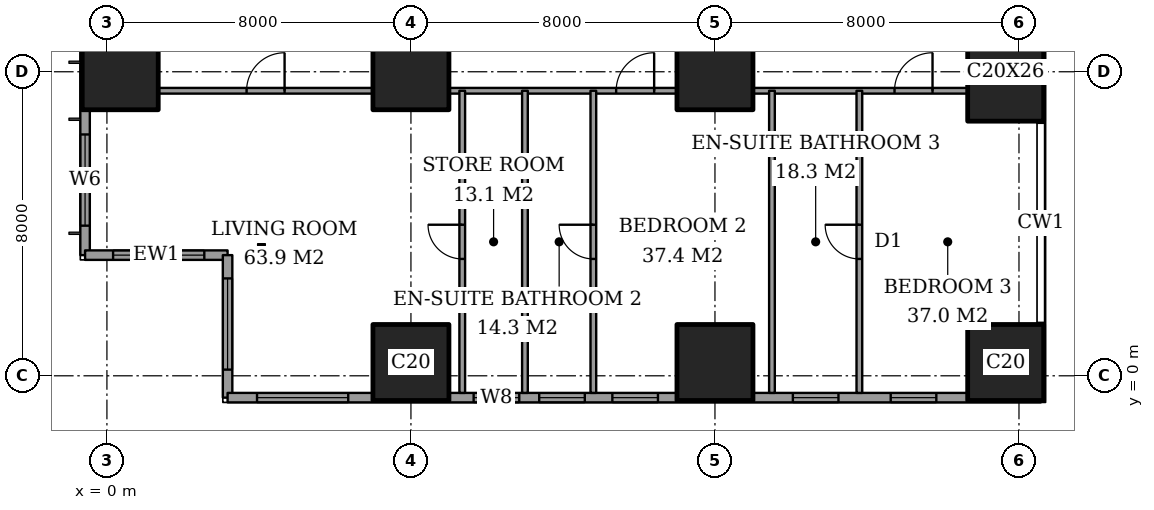
"""IFC4 building model, lengths in metres.
Left out: names, types, materials, properties, quantities, classifications, styles, units other than length and angle.
Written with IfcOpenShell. Run it as: python <this file> out.ifc"""

import sys

from ifc_helpers import new_model, si_unit, direction, frame, frame_2d, origin, origin_2d, place, context, subcontext, project, spatial, rectangle, extrude, element, fill, save


model = new_model("IFC4")
c1 = context("Model", 3, precision=1e-05, world=origin(), true_north=direction((0.0, 1.0)))
c2 = subcontext(c1, "Body", "Model", "MODEL_VIEW")
j1 = project(units=[si_unit("LENGTHUNIT", "METRE"), si_unit("PLANEANGLEUNIT", "RADIAN")], contexts=[c1])
p1 = place(None, origin())
s1 = spatial("IfcSite", under=j1, at=p1, CompositionType="ELEMENT")
p2 = place(p1, origin())
s2 = spatial("IfcBuilding", under=s1, at=p2, CompositionType="ELEMENT")
p3 = place(p2, frame((0.0, 0.0, 33.2)))
s3 = spatial("IfcBuildingStorey", under=s2, at=p3, CompositionType="ELEMENT", Elevation=33.2)
for number, where, z_axis, x_axis in (
    (1, (0.35, 8.0, 0.0), (0.0, 0.0, 1.0), (1.0, 0.0, 0.0)),
    (2, (8.0, 0.35, 0.0), (0.0, 0.0, 1.0), (1.0, 0.0, 0.0)),
    (3, (8.0, 8.0, 0.0), (0.0, 0.0, 1.0), (1.0, 0.0, 0.0)),
    (4, (16.0, 0.35, 0.0), (0.0, 0.0, 1.0), (1.0, 0.0, 0.0)),
    (5, (16.0, 8.0, 0.0), (0.0, 0.0, 1.0), (1.0, 0.0, 0.0)),
    (6, (23.65, 0.35, 0.0), (0.0, 0.0, 1.0), (1.0, 0.0, 0.0)),
):
    element("IfcColumn", number, at=place(p3, frame(where, z_axis=z_axis, x_axis=x_axis)), inside=s3, PredefinedType="COLUMN", context=c2, shape_type="SweptSolid", body=[
        extrude(rectangle(XDim=2.0, YDim=2.0, at=origin_2d()), origin(), (0.0, 0.0, 1.0), 3.6),
    ])
p4 = place(p3, frame((23.65, 8.0, 0.0), z_axis=(0.0, 0.0, 1.0), x_axis=(1.0, 0.0, 0.0)))
e7 = element("IfcColumn", 7, at=p4, inside=s3, PredefinedType="COLUMN", context=c2, shape_type="SweptSolid", body=[
    extrude(rectangle(XDim=2.0, YDim=2.6, at=origin_2d()), origin(), (0.0, 0.0, 1.0), 3.6),
])
p5 = place(p3, frame((-0.575, 44.825, 0.0), z_axis=(0.0, 0.0, 1.0), x_axis=(0.0, -1.0, 0.0)))
e8 = element("IfcWall", 8, at=p5, inside=s3, PredefinedType="SOLIDWALL", context=c2, shape_type="SweptSolid", body=[
    extrude(rectangle(XDim=41.65, YDim=0.25, at=frame_2d((20.825, 0.0))), origin(), (0.0, 0.0, 1.0), 3.6),
])
p6 = place(p5, frame((0.775, 0.0, 0.6)))
e9 = element("IfcOpeningElement", 9, at=p6, cuts=e8, PredefinedType="OPENING", context=c2, shape_type="SweptSolid", body=[
    extrude(rectangle(XDim=2.4, YDim=2.0, at=frame_2d((1.2, 1.0))), frame((0.0, 0.135, 0.0), z_axis=(0.0, -1.0, 0.0), x_axis=(1.0, 0.0, 0.0)), (0.0, 0.0, 1.0), 0.27),
])
p7 = place(p5, frame((6.225, 0.0, 0.6)))
e10 = element("IfcOpeningElement", 10, at=p7, cuts=e8, PredefinedType="OPENING", context=c2, shape_type="SweptSolid", body=[
    extrude(rectangle(XDim=1.2, YDim=2.0, at=frame_2d((0.6, 1.0))), frame((0.0, 0.135, 0.0), z_axis=(0.0, -1.0, 0.0), x_axis=(1.0, 0.0, 0.0)), (0.0, 0.0, 1.0), 0.27),
])
p8 = place(p5, frame((8.625, 0.0, 0.6)))
e11 = element("IfcOpeningElement", 11, at=p8, cuts=e8, PredefinedType="OPENING", context=c2, shape_type="SweptSolid", body=[
    extrude(rectangle(XDim=2.4, YDim=2.0, at=frame_2d((1.2, 1.0))), frame((0.0, 0.135, 0.0), z_axis=(0.0, -1.0, 0.0), x_axis=(1.0, 0.0, 0.0)), (0.0, 0.0, 1.0), 0.27),
])
p9 = place(p5, frame((15.625, 0.0, 0.6)))
e12 = element("IfcOpeningElement", 12, at=p9, cuts=e8, PredefinedType="OPENING", context=c2, shape_type="SweptSolid", body=[
    extrude(rectangle(XDim=2.4, YDim=2.0, at=frame_2d((1.2, 1.0))), frame((0.0, 0.135, 0.0), z_axis=(0.0, -1.0, 0.0), x_axis=(1.0, 0.0, 0.0)), (0.0, 0.0, 1.0), 0.27),
])
p10 = place(p5, frame((23.625, 0.0, 0.6)))
e13 = element("IfcOpeningElement", 13, at=p10, cuts=e8, PredefinedType="OPENING", context=c2, shape_type="SweptSolid", body=[
    extrude(rectangle(XDim=2.4, YDim=2.0, at=frame_2d((1.2, 1.0))), frame((0.0, 0.135, 0.0), z_axis=(0.0, -1.0, 0.0), x_axis=(1.0, 0.0, 0.0)), (0.0, 0.0, 1.0), 0.27),
])
p11 = place(p5, frame((30.825, 0.0, 0.6)))
e14 = element("IfcOpeningElement", 14, at=p11, cuts=e8, PredefinedType="OPENING", context=c2, shape_type="SweptSolid", body=[
    extrude(rectangle(XDim=2.4, YDim=2.0, at=frame_2d((1.2, 1.0))), frame((0.0, 0.135, 0.0), z_axis=(0.0, -1.0, 0.0), x_axis=(1.0, 0.0, 0.0)), (0.0, 0.0, 1.0), 0.27),
])
p12 = place(p5, frame((34.5, 0.0, 0.6)))
e15 = element("IfcOpeningElement", 15, at=p12, cuts=e8, PredefinedType="OPENING", context=c2, shape_type="SweptSolid", body=[
    extrude(rectangle(XDim=1.2, YDim=2.0, at=frame_2d((0.6, 1.0))), frame((0.0, 0.135, 0.0), z_axis=(0.0, -1.0, 0.0), x_axis=(1.0, 0.0, 0.0)), (0.0, 0.0, 1.0), 0.27),
])
p13 = place(p5, frame((38.475, 0.0, 0.6)))
e16 = element("IfcOpeningElement", 16, at=p13, cuts=e8, PredefinedType="OPENING", context=c2, shape_type="SweptSolid", body=[
    extrude(rectangle(XDim=2.4, YDim=2.0, at=frame_2d((1.2, 1.0))), frame((0.0, 0.135, 0.0), z_axis=(0.0, -1.0, 0.0), x_axis=(1.0, 0.0, 0.0)), (0.0, 0.0, 1.0), 0.27),
])
p14 = place(p3, frame((-0.575, 3.175, 0.0), z_axis=(0.0, 0.0, 1.0), x_axis=(1.0, 0.0, 0.0)))
e17 = element("IfcWall", 17, at=p14, inside=s3, PredefinedType="SOLIDWALL", context=c2, shape_type="SweptSolid", body=[
    extrude(rectangle(XDim=3.75, YDim=0.25, at=frame_2d((1.875, 0.0))), origin(), (0.0, 0.0, 1.0), 3.6),
])
p15 = place(p14, frame((0.738, 0.0, 0.6)))
e18 = element("IfcOpeningElement", 18, at=p15, cuts=e17, PredefinedType="OPENING", context=c2, shape_type="SweptSolid", body=[
    extrude(rectangle(XDim=2.4, YDim=2.0, at=frame_2d((1.2, 1.0))), frame((0.0, 0.135, 0.0), z_axis=(0.0, -1.0, 0.0), x_axis=(1.0, 0.0, 0.0)), (0.0, 0.0, 1.0), 0.27),
])
p16 = place(p3, frame((3.175, 3.175, 0.0), z_axis=(0.0, 0.0, 1.0), x_axis=(0.0, -1.0, 0.0)))
e19 = element("IfcWall", 19, at=p16, inside=s3, PredefinedType="SOLIDWALL", context=c2, shape_type="SweptSolid", body=[
    extrude(rectangle(XDim=3.75, YDim=0.25, at=frame_2d((1.875, 0.0))), origin(), (0.0, 0.0, 1.0), 3.6),
])
p17 = place(p16, frame((0.613, 0.0, 0.6)))
e20 = element("IfcOpeningElement", 20, at=p17, cuts=e19, PredefinedType="OPENING", context=c2, shape_type="SweptSolid", body=[
    extrude(rectangle(XDim=2.4, YDim=2.0, at=frame_2d((1.2, 1.0))), frame((0.0, 0.135, 0.0), z_axis=(0.0, -1.0, 0.0), x_axis=(1.0, 0.0, 0.0)), (0.0, 0.0, 1.0), 0.27),
])
p18 = place(p3, frame((3.175, -0.575, 0.0), z_axis=(0.0, 0.0, 1.0), x_axis=(1.0, 0.0, 0.0)))
e21 = element("IfcWall", 21, at=p18, inside=s3, PredefinedType="SOLIDWALL", context=c2, shape_type="SweptSolid", body=[
    extrude(rectangle(XDim=21.4, YDim=0.25, at=frame_2d((10.7, 0.0))), origin(), (0.0, 0.0, 1.0), 3.6),
])
p19 = place(p18, frame((0.775, 0.0, 0.6)))
e22 = element("IfcOpeningElement", 22, at=p19, cuts=e21, PredefinedType="OPENING", context=c2, shape_type="SweptSolid", body=[
    extrude(rectangle(XDim=2.4, YDim=2.0, at=frame_2d((1.2, 1.0))), frame((0.0, 0.135, 0.0), z_axis=(0.0, -1.0, 0.0), x_axis=(1.0, 0.0, 0.0)), (0.0, 0.0, 1.0), 0.27),
])
p20 = place(p18, frame((6.475, 0.0, 0.6)))
e23 = element("IfcOpeningElement", 23, at=p20, cuts=e21, PredefinedType="OPENING", context=c2, shape_type="SweptSolid", body=[
    extrude(rectangle(XDim=1.2, YDim=2.0, at=frame_2d((0.6, 1.0))), frame((0.0, 0.135, 0.0), z_axis=(0.0, -1.0, 0.0), x_axis=(1.0, 0.0, 0.0)), (0.0, 0.0, 1.0), 0.27),
])
p21 = place(p18, frame((8.2, 0.0, 0.6)))
e24 = element("IfcOpeningElement", 24, at=p21, cuts=e21, PredefinedType="OPENING", context=c2, shape_type="SweptSolid", body=[
    extrude(rectangle(XDim=1.2, YDim=2.0, at=frame_2d((0.6, 1.0))), frame((0.0, 0.135, 0.0), z_axis=(0.0, -1.0, 0.0), x_axis=(1.0, 0.0, 0.0)), (0.0, 0.0, 1.0), 0.27),
])
p22 = place(p18, frame((10.125, 0.0, 0.6)))
e25 = element("IfcOpeningElement", 25, at=p22, cuts=e21, PredefinedType="OPENING", context=c2, shape_type="SweptSolid", body=[
    extrude(rectangle(XDim=1.2, YDim=2.0, at=frame_2d((0.6, 1.0))), frame((0.0, 0.135, 0.0), z_axis=(0.0, -1.0, 0.0), x_axis=(1.0, 0.0, 0.0)), (0.0, 0.0, 1.0), 0.27),
])
p23 = place(p18, frame((14.875, 0.0, 0.6)))
e26 = element("IfcOpeningElement", 26, at=p23, cuts=e21, PredefinedType="OPENING", context=c2, shape_type="SweptSolid", body=[
    extrude(rectangle(XDim=1.2, YDim=2.0, at=frame_2d((0.6, 1.0))), frame((0.0, 0.135, 0.0), z_axis=(0.0, -1.0, 0.0), x_axis=(1.0, 0.0, 0.0)), (0.0, 0.0, 1.0), 0.27),
])
p24 = place(p18, frame((17.45, 0.0, 0.6)))
e27 = element("IfcOpeningElement", 27, at=p24, cuts=e21, PredefinedType="OPENING", context=c2, shape_type="SweptSolid", body=[
    extrude(rectangle(XDim=1.2, YDim=2.0, at=frame_2d((0.6, 1.0))), frame((0.0, 0.135, 0.0), z_axis=(0.0, -1.0, 0.0), x_axis=(1.0, 0.0, 0.0)), (0.0, 0.0, 1.0), 0.27),
])
p25 = place(p3, frame((1.35, 7.5, 0.0), z_axis=(0.0, 0.0, 1.0), x_axis=(1.0, 0.0, 0.0)))
e28 = element("IfcWall", 28, at=p25, inside=s3, PredefinedType="PARTITIONING", context=c2, shape_type="SweptSolid", body=[
    extrude(rectangle(XDim=5.65, YDim=0.15, at=frame_2d((2.825, 0.0))), origin(), (0.0, 0.0, 1.0), 3.35),
])
p26 = place(p25, frame((2.325, 0.0, 0.0)))
e29 = element("IfcOpeningElement", 29, at=p26, cuts=e28, PredefinedType="OPENING", context=c2, shape_type="SweptSolid", body=[
    extrude(rectangle(XDim=1.0, YDim=2.1, at=frame_2d((0.5, 1.05))), frame((0.0, 0.085, 0.0), z_axis=(0.0, -1.0, 0.0), x_axis=(1.0, 0.0, 0.0)), (0.0, 0.0, 1.0), 0.17),
])
p27 = place(p3, frame((9.0, 7.5, 0.0), z_axis=(0.0, 0.0, 1.0), x_axis=(1.0, 0.0, 0.0)))
e30 = element("IfcWall", 30, at=p27, inside=s3, PredefinedType="PARTITIONING", context=c2, shape_type="SweptSolid", body=[
    extrude(rectangle(XDim=6.0, YDim=0.15, at=frame_2d((3.0, 0.0))), origin(), (0.0, 0.0, 1.0), 3.35),
])
p28 = place(p27, frame((4.4, 0.0, 0.0)))
e31 = element("IfcOpeningElement", 31, at=p28, cuts=e30, PredefinedType="OPENING", context=c2, shape_type="SweptSolid", body=[
    extrude(rectangle(XDim=1.0, YDim=2.1, at=frame_2d((0.5, 1.05))), frame((0.0, 0.085, 0.0), z_axis=(0.0, -1.0, 0.0), x_axis=(1.0, 0.0, 0.0)), (0.0, 0.0, 1.0), 0.17),
])
p29 = place(p3, frame((17.0, 7.5, 0.0), z_axis=(0.0, 0.0, 1.0), x_axis=(1.0, 0.0, 0.0)))
e32 = element("IfcWall", 32, at=p29, inside=s3, PredefinedType="PARTITIONING", context=c2, shape_type="SweptSolid", body=[
    extrude(rectangle(XDim=5.65, YDim=0.15, at=frame_2d((2.825, 0.0))), origin(), (0.0, 0.0, 1.0), 3.35),
])
p30 = place(p29, frame((3.725, 0.0, 0.0)))
e33 = element("IfcOpeningElement", 33, at=p30, cuts=e32, PredefinedType="OPENING", context=c2, shape_type="SweptSolid", body=[
    extrude(rectangle(XDim=1.0, YDim=2.1, at=frame_2d((0.5, 1.05))), frame((0.0, 0.085, 0.0), z_axis=(0.0, -1.0, 0.0), x_axis=(1.0, 0.0, 0.0)), (0.0, 0.0, 1.0), 0.17),
])
p31 = place(p3, frame((9.35, -0.45, 0.0), z_axis=(0.0, 0.0, 1.0), x_axis=(0.0, 1.0, 0.0)))
e34 = element("IfcWall", 34, at=p31, inside=s3, PredefinedType="PARTITIONING", context=c2, shape_type="SweptSolid", body=[
    extrude(rectangle(XDim=7.95, YDim=0.15, at=frame_2d((3.975, 0.0))), origin(), (0.0, 0.0, 1.0), 3.35),
])
p32 = place(p31, frame((3.525, 0.0, 0.0)))
e35 = element("IfcOpeningElement", 35, at=p32, cuts=e34, PredefinedType="OPENING", context=c2, shape_type="SweptSolid", body=[
    extrude(rectangle(XDim=0.9, YDim=2.1, at=frame_2d((0.45, 1.05))), frame((0.0, 0.085, 0.0), z_axis=(0.0, -1.0, 0.0), x_axis=(1.0, 0.0, 0.0)), (0.0, 0.0, 1.0), 0.17),
])
p33 = place(p3, frame((11.0, -0.45, 0.0), z_axis=(0.0, 0.0, 1.0), x_axis=(0.0, 1.0, 0.0)))
e36 = element("IfcWall", 36, at=p33, inside=s3, PredefinedType="PARTITIONING", context=c2, shape_type="SweptSolid", body=[
    extrude(rectangle(XDim=7.95, YDim=0.15, at=frame_2d((3.975, 0.0))), origin(), (0.0, 0.0, 1.0), 3.35),
])
p34 = place(p3, frame((12.8, -0.45, 0.0), z_axis=(0.0, 0.0, 1.0), x_axis=(0.0, 1.0, 0.0)))
e37 = element("IfcWall", 37, at=p34, inside=s3, PredefinedType="PARTITIONING", context=c2, shape_type="SweptSolid", body=[
    extrude(rectangle(XDim=7.95, YDim=0.15, at=frame_2d((3.975, 0.0))), origin(), (0.0, 0.0, 1.0), 3.35),
])
p35 = place(p34, frame((3.525, 0.0, 0.0)))
e38 = element("IfcOpeningElement", 38, at=p35, cuts=e37, PredefinedType="OPENING", context=c2, shape_type="SweptSolid", body=[
    extrude(rectangle(XDim=0.9, YDim=2.1, at=frame_2d((0.45, 1.05))), frame((0.0, 0.085, 0.0), z_axis=(0.0, -1.0, 0.0), x_axis=(1.0, 0.0, 0.0)), (0.0, 0.0, 1.0), 0.17),
])
p36 = place(p3, frame((17.5, -0.45, 0.0), z_axis=(0.0, 0.0, 1.0), x_axis=(0.0, 1.0, 0.0)))
e39 = element("IfcWall", 39, at=p36, inside=s3, PredefinedType="PARTITIONING", context=c2, shape_type="SweptSolid", body=[
    extrude(rectangle(XDim=7.95, YDim=0.15, at=frame_2d((3.975, 0.0))), origin(), (0.0, 0.0, 1.0), 3.35),
])
p37 = place(p3, frame((19.8, -0.45, 0.0), z_axis=(0.0, 0.0, 1.0), x_axis=(0.0, 1.0, 0.0)))
e40 = element("IfcWall", 40, at=p37, inside=s3, PredefinedType="PARTITIONING", context=c2, shape_type="SweptSolid", body=[
    extrude(rectangle(XDim=7.95, YDim=0.15, at=frame_2d((3.975, 0.0))), origin(), (0.0, 0.0, 1.0), 3.35),
])
p38 = place(p37, frame((3.525, 0.0, 0.0)))
e41 = element("IfcOpeningElement", 41, at=p38, cuts=e40, PredefinedType="OPENING", context=c2, shape_type="SweptSolid", body=[
    extrude(rectangle(XDim=0.9, YDim=2.1, at=frame_2d((0.45, 1.05))), frame((0.0, 0.085, 0.0), z_axis=(0.0, -1.0, 0.0), x_axis=(1.0, 0.0, 0.0)), (0.0, 0.0, 1.0), 0.17),
])
p39 = place(p13, origin())
e42 = element("IfcWindow", 42, at=p39, inside=s3, PartitioningType="SINGLE_PANEL", PredefinedType="WINDOW", context=c2, shape_type="SweptSolid", body=[
    extrude(rectangle(XDim=2.4, YDim=2.0, at=frame_2d((1.2, 1.0))), frame((0.0, 0.03, 0.0), z_axis=(0.0, -1.0, 0.0), x_axis=(1.0, 0.0, 0.0)), (0.0, 0.0, 1.0), 0.06),
])
fill(e16, e42)
p40 = place(p15, origin())
e43 = element("IfcWindow", 43, at=p40, inside=s3, PartitioningType="SINGLE_PANEL", PredefinedType="WINDOW", context=c2, shape_type="SweptSolid", body=[
    extrude(rectangle(XDim=2.4, YDim=2.0, at=frame_2d((1.2, 1.0))), frame((0.0, 0.03, 0.0), z_axis=(0.0, -1.0, 0.0), x_axis=(1.0, 0.0, 0.0)), (0.0, 0.0, 1.0), 0.06),
])
fill(e18, e43)
p41 = place(p17, origin())
e44 = element("IfcWindow", 44, at=p41, inside=s3, PartitioningType="SINGLE_PANEL", PredefinedType="WINDOW", context=c2, shape_type="SweptSolid", body=[
    extrude(rectangle(XDim=2.4, YDim=2.0, at=frame_2d((1.2, 1.0))), frame((0.0, 0.03, 0.0), z_axis=(0.0, -1.0, 0.0), x_axis=(1.0, 0.0, 0.0)), (0.0, 0.0, 1.0), 0.06),
])
fill(e20, e44)
p42 = place(p19, origin())
e45 = element("IfcWindow", 45, at=p42, inside=s3, PartitioningType="SINGLE_PANEL", PredefinedType="WINDOW", context=c2, shape_type="SweptSolid", body=[
    extrude(rectangle(XDim=2.4, YDim=2.0, at=frame_2d((1.2, 1.0))), frame((0.0, 0.03, 0.0), z_axis=(0.0, -1.0, 0.0), x_axis=(1.0, 0.0, 0.0)), (0.0, 0.0, 1.0), 0.06),
])
fill(e22, e45)
p43 = place(p20, origin())
e46 = element("IfcWindow", 46, at=p43, inside=s3, PartitioningType="SINGLE_PANEL", PredefinedType="WINDOW", context=c2, shape_type="SweptSolid", body=[
    extrude(rectangle(XDim=1.2, YDim=2.0, at=frame_2d((0.6, 1.0))), frame((0.0, 0.03, 0.0), z_axis=(0.0, -1.0, 0.0), x_axis=(1.0, 0.0, 0.0)), (0.0, 0.0, 1.0), 0.06),
])
fill(e23, e46)
p44 = place(p21, origin())
e47 = element("IfcWindow", 47, at=p44, inside=s3, PartitioningType="SINGLE_PANEL", PredefinedType="WINDOW", context=c2, shape_type="SweptSolid", body=[
    extrude(rectangle(XDim=1.2, YDim=2.0, at=frame_2d((0.6, 1.0))), frame((0.0, 0.03, 0.0), z_axis=(0.0, -1.0, 0.0), x_axis=(1.0, 0.0, 0.0)), (0.0, 0.0, 1.0), 0.06),
])
fill(e24, e47)
p45 = place(p22, origin())
e48 = element("IfcWindow", 48, at=p45, inside=s3, PartitioningType="SINGLE_PANEL", PredefinedType="WINDOW", context=c2, shape_type="SweptSolid", body=[
    extrude(rectangle(XDim=1.2, YDim=2.0, at=frame_2d((0.6, 1.0))), frame((0.0, 0.03, 0.0), z_axis=(0.0, -1.0, 0.0), x_axis=(1.0, 0.0, 0.0)), (0.0, 0.0, 1.0), 0.06),
])
fill(e25, e48)
p46 = place(p23, origin())
e49 = element("IfcWindow", 49, at=p46, inside=s3, PartitioningType="SINGLE_PANEL", PredefinedType="WINDOW", context=c2, shape_type="SweptSolid", body=[
    extrude(rectangle(XDim=1.2, YDim=2.0, at=frame_2d((0.6, 1.0))), frame((0.0, 0.03, 0.0), z_axis=(0.0, -1.0, 0.0), x_axis=(1.0, 0.0, 0.0)), (0.0, 0.0, 1.0), 0.06),
])
fill(e26, e49)
p47 = place(p24, origin())
e50 = element("IfcWindow", 50, at=p47, inside=s3, PartitioningType="SINGLE_PANEL", PredefinedType="WINDOW", context=c2, shape_type="SweptSolid", body=[
    extrude(rectangle(XDim=1.2, YDim=2.0, at=frame_2d((0.6, 1.0))), frame((0.0, 0.03, 0.0), z_axis=(0.0, -1.0, 0.0), x_axis=(1.0, 0.0, 0.0)), (0.0, 0.0, 1.0), 0.06),
])
fill(e27, e50)
p48 = place(p26, origin())
e51 = element("IfcDoor", 51, at=p48, inside=s3, OperationType="SINGLE_SWING_LEFT", PredefinedType="DOOR", context=c2, shape_type="SweptSolid", body=[
    extrude(rectangle(XDim=1.0, YDim=2.1, at=frame_2d((0.5, 1.05))), frame((0.0, 0.025, 0.0), z_axis=(0.0, -1.0, 0.0), x_axis=(1.0, 0.0, 0.0)), (0.0, 0.0, 1.0), 0.05),
])
fill(e29, e51)
p49 = place(p32, origin())
e52 = element("IfcDoor", 52, at=p49, inside=s3, OperationType="SINGLE_SWING_LEFT", PredefinedType="DOOR", context=c2, shape_type="SweptSolid", body=[
    extrude(rectangle(XDim=0.9, YDim=2.1, at=frame_2d((0.45, 1.05))), frame((0.0, 0.025, 0.0), z_axis=(0.0, -1.0, 0.0), x_axis=(1.0, 0.0, 0.0)), (0.0, 0.0, 1.0), 0.05),
])
fill(e35, e52)
p50 = place(p35, origin())
e53 = element("IfcDoor", 53, at=p50, inside=s3, OperationType="SINGLE_SWING_LEFT", PredefinedType="DOOR", context=c2, shape_type="SweptSolid", body=[
    extrude(rectangle(XDim=0.9, YDim=2.1, at=frame_2d((0.45, 1.05))), frame((0.0, 0.025, 0.0), z_axis=(0.0, -1.0, 0.0), x_axis=(1.0, 0.0, 0.0)), (0.0, 0.0, 1.0), 0.05),
])
fill(e38, e53)
p51 = place(p28, origin())
e54 = element("IfcDoor", 54, at=p51, inside=s3, OperationType="SINGLE_SWING_LEFT", PredefinedType="DOOR", context=c2, shape_type="SweptSolid", body=[
    extrude(rectangle(XDim=1.0, YDim=2.1, at=frame_2d((0.5, 1.05))), frame((0.0, 0.025, 0.0), z_axis=(0.0, -1.0, 0.0), x_axis=(1.0, 0.0, 0.0)), (0.0, 0.0, 1.0), 0.05),
])
fill(e31, e54)
p52 = place(p38, origin())
e55 = element("IfcDoor", 55, at=p52, inside=s3, OperationType="SINGLE_SWING_LEFT", PredefinedType="DOOR", context=c2, shape_type="SweptSolid", body=[
    extrude(rectangle(XDim=0.9, YDim=2.1, at=frame_2d((0.45, 1.05))), frame((0.0, 0.025, 0.0), z_axis=(0.0, -1.0, 0.0), x_axis=(1.0, 0.0, 0.0)), (0.0, 0.0, 1.0), 0.05),
])
fill(e41, e55)
p53 = place(p30, origin())
e56 = element("IfcDoor", 56, at=p53, inside=s3, OperationType="SINGLE_SWING_LEFT", PredefinedType="DOOR", context=c2, shape_type="SweptSolid", body=[
    extrude(rectangle(XDim=1.0, YDim=2.1, at=frame_2d((0.5, 1.05))), frame((0.0, 0.025, 0.0), z_axis=(0.0, -1.0, 0.0), x_axis=(1.0, 0.0, 0.0)), (0.0, 0.0, 1.0), 0.05),
])
fill(e33, e56)
save(model, sys.argv[1])
